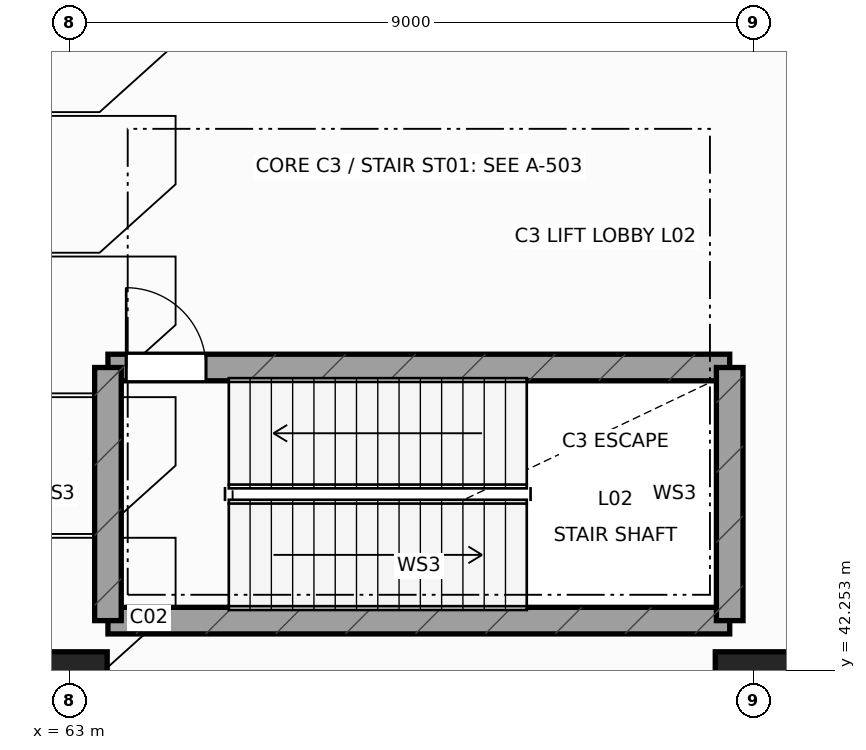
"""IFC4 building model, lengths in metres.
Left out: names, types, materials, properties, quantities, classifications, styles, units other than length and angle.
Written with IfcOpenShell. Run it as: python <this file> out.ifc"""

import sys

from ifc_helpers import new_model, si_unit, direction, frame, frame_2d, origin, origin_2d, place, context, subcontext, project, spatial, rectangle, extrude, element, fill, save


model = new_model("IFC4")
c1 = context("Model", 3, precision=1e-05, world=origin(), true_north=direction((0.0, 1.0)))
c2 = subcontext(c1, "Body", "Model", "MODEL_VIEW")
j1 = project(units=[si_unit("LENGTHUNIT", "METRE"), si_unit("PLANEANGLEUNIT", "RADIAN")], contexts=[c1])
p1 = place(None, origin())
s1 = spatial("IfcSite", under=j1, at=p1, CompositionType="ELEMENT")
p2 = place(p1, origin())
s2 = spatial("IfcBuilding", under=s1, at=p2, CompositionType="ELEMENT")
p3 = place(p2, frame((0.0, 0.0, 11.4)))
s3 = spatial("IfcBuildingStorey", under=s2, at=p3, CompositionType="ELEMENT", Elevation=11.4)
for number, where, z_axis, x_axis in (
    (1, (63.0, 42.0, 0.0), (0.0, 0.0, 1.0), (1.0, 0.0, 0.0)),
    (2, (72.0, 42.0, 0.0), (0.0, 0.0, 1.0), (1.0, 0.0, 0.0)),
):
    element("IfcColumn", number, at=place(p3, frame(where, z_axis=z_axis, x_axis=x_axis)), inside=s3, PredefinedType="COLUMN", context=c2, shape_type="SweptSolid", body=[
        extrude(rectangle(XDim=1.0, YDim=1.0, at=origin_2d()), origin(), (0.0, 0.0, 1.0), 5.4),
    ])
p4 = place(p3, frame((63.51, 42.91, 0.0), z_axis=(0.0, 0.0, 1.0), x_axis=(1.0, 0.0, 0.0)))
e3 = element("IfcWall", 3, at=p4, inside=s3, PredefinedType="SHEAR", context=c2, shape_type="SweptSolid", body=[
    extrude(rectangle(XDim=8.18, YDim=0.35, at=frame_2d((4.09, 0.0))), origin(), (0.0, 0.0, 1.0), 5.12),
])
p5 = place(p3, frame((63.51, 46.24, 0.0), z_axis=(0.0, 0.0, 1.0), x_axis=(1.0, 0.0, 0.0)))
e4 = element("IfcWall", 4, at=p5, inside=s3, PredefinedType="SHEAR", context=c2, shape_type="SweptSolid", body=[
    extrude(rectangle(XDim=8.18, YDim=0.35, at=frame_2d((4.09, 0.0))), origin(), (0.0, 0.0, 1.0), 5.12),
])
p6 = place(p5, frame((0.24, 0.0, 0.0)))
e5 = element("IfcOpeningElement", 5, at=p6, cuts=e4, PredefinedType="OPENING", context=c2, shape_type="SweptSolid", body=[
    extrude(rectangle(XDim=1.05, YDim=2.18, at=frame_2d((0.525, 1.09))), frame((0.0, 0.185, 0.0), z_axis=(0.0, -1.0, 0.0), x_axis=(1.0, 0.0, 0.0)), (0.0, 0.0, 1.0), 0.37),
])
for number, where, z_axis, x_axis in (
    (6, (63.51, 42.91, 0.0), (0.0, 0.0, 1.0), (0.0, 1.0, 0.0)),
    (7, (71.69, 42.91, 0.0), (0.0, 0.0, 1.0), (0.0, 1.0, 0.0)),
):
    element("IfcWall", number, at=place(p3, frame(where, z_axis=z_axis, x_axis=x_axis)), inside=s3, PredefinedType="SHEAR", context=c2, shape_type="SweptSolid", body=[
        extrude(rectangle(XDim=3.33, YDim=0.35, at=frame_2d((1.665, 0.0))), origin(), (0.0, 0.0, 1.0), 5.12),
    ])
p7 = place(p6, origin())
e8 = element("IfcDoor", 8, at=p7, inside=s3, OperationType="SINGLE_SWING_LEFT", PredefinedType="DOOR", context=c2, shape_type="SweptSolid", body=[
    extrude(rectangle(XDim=1.05, YDim=2.18, at=frame_2d((0.525, 1.09))), frame((0.0, 0.025, 0.0), z_axis=(0.0, -1.0, 0.0), x_axis=(1.0, 0.0, 0.0)), (0.0, 0.0, 1.0), 0.05),
])
fill(e5, e8)
save(model, sys.argv[1])
